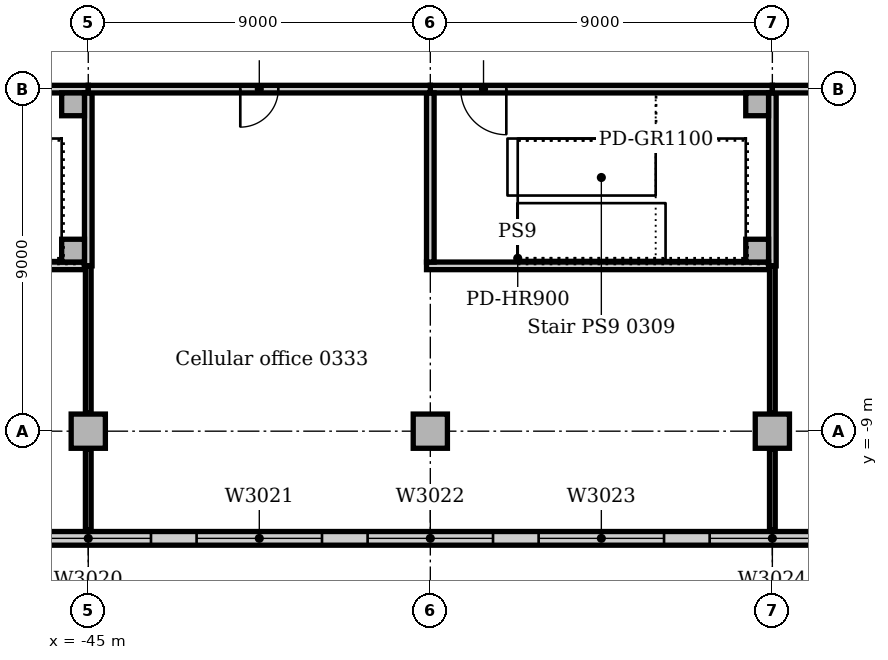
"""IFC4 building model, lengths in metres.
Left out: names, types, materials, properties, quantities, classifications, styles, units other than length and angle.
Written with IfcOpenShell. Run it as: python <this file> out.ifc"""

import sys

from ifc_helpers import new_model, si_unit, direction, frame, frame_2d, origin, origin_2d, place, context, subcontext, project, spatial, rectangle, extrude, element, fill, save


model = new_model("IFC4")
c1 = context("Model", 3, precision=1e-05, world=origin(), true_north=direction((0.0, 1.0)))
c2 = subcontext(c1, "Body", "Model", "MODEL_VIEW")
j1 = project(units=[si_unit("LENGTHUNIT", "METRE"), si_unit("PLANEANGLEUNIT", "RADIAN")], contexts=[c1])
p1 = place(None, origin())
s1 = spatial("IfcSite", under=j1, at=p1, CompositionType="ELEMENT")
p2 = place(p1, origin())
s2 = spatial("IfcBuilding", under=s1, at=p2, CompositionType="ELEMENT")
p3 = place(p2, frame((0.0, 0.0, 16.0)))
s3 = spatial("IfcBuildingStorey", under=s2, at=p3, CompositionType="ELEMENT", Elevation=16.0)
for number, where, z_axis, x_axis in (
    (1, (-45.0, -9.0, 0.0), (0.0, 0.0, 1.0), (1.0, 0.0, 0.0)),
    (2, (-36.0, -9.0, 0.0), (0.0, 0.0, 1.0), (1.0, 0.0, 0.0)),
    (3, (-27.0, -9.0, 0.0), (0.0, 0.0, 1.0), (1.0, 0.0, 0.0)),
):
    element("IfcColumn", number, at=place(p3, frame(where, z_axis=z_axis, x_axis=x_axis)), inside=s3, PredefinedType="COLUMN", context=c2, shape_type="SweptSolid", body=[
        extrude(rectangle(XDim=0.9, YDim=0.9, at=origin_2d()), origin(), (0.0, 0.0, 1.0), 4.7),
    ])
p4 = place(p3, frame((-81.0, -11.82, 0.0), z_axis=(0.0, 0.0, 1.0), x_axis=(1.0, 0.0, 0.0)))
e4 = element("IfcWall", 4, at=p4, inside=s3, PredefinedType="STANDARD", context=c2, shape_type="SweptSolid", body=[
    extrude(rectangle(XDim=144.0, YDim=0.36, at=frame_2d((72.0, 0.0))), origin(), (0.0, 0.0, 1.0), 4.7),
])
p5 = place(p4, frame((2.85, 0.0, 0.9)))
e5 = element("IfcOpeningElement", 5, at=p5, cuts=e4, PredefinedType="OPENING", context=c2, shape_type="SweptSolid", body=[
    extrude(rectangle(XDim=3.3, YDim=2.4, at=frame_2d((1.65, 1.2))), frame((0.0, 0.19, 0.0), z_axis=(0.0, -1.0, 0.0), x_axis=(1.0, 0.0, 0.0)), (0.0, 0.0, 1.0), 0.38),
])
p6 = place(p4, frame((7.35, 0.0, 0.9)))
e6 = element("IfcOpeningElement", 6, at=p6, cuts=e4, PredefinedType="OPENING", context=c2, shape_type="SweptSolid", body=[
    extrude(rectangle(XDim=3.3, YDim=2.4, at=frame_2d((1.65, 1.2))), frame((0.0, 0.19, 0.0), z_axis=(0.0, -1.0, 0.0), x_axis=(1.0, 0.0, 0.0)), (0.0, 0.0, 1.0), 0.38),
])
p7 = place(p4, frame((11.85, 0.0, 0.9)))
e7 = element("IfcOpeningElement", 7, at=p7, cuts=e4, PredefinedType="OPENING", context=c2, shape_type="SweptSolid", body=[
    extrude(rectangle(XDim=3.3, YDim=2.4, at=frame_2d((1.65, 1.2))), frame((0.0, 0.19, 0.0), z_axis=(0.0, -1.0, 0.0), x_axis=(1.0, 0.0, 0.0)), (0.0, 0.0, 1.0), 0.38),
])
p8 = place(p4, frame((16.35, 0.0, 0.9)))
e8 = element("IfcOpeningElement", 8, at=p8, cuts=e4, PredefinedType="OPENING", context=c2, shape_type="SweptSolid", body=[
    extrude(rectangle(XDim=3.3, YDim=2.4, at=frame_2d((1.65, 1.2))), frame((0.0, 0.19, 0.0), z_axis=(0.0, -1.0, 0.0), x_axis=(1.0, 0.0, 0.0)), (0.0, 0.0, 1.0), 0.38),
])
p9 = place(p4, frame((20.85, 0.0, 0.9)))
e9 = element("IfcOpeningElement", 9, at=p9, cuts=e4, PredefinedType="OPENING", context=c2, shape_type="SweptSolid", body=[
    extrude(rectangle(XDim=3.3, YDim=2.4, at=frame_2d((1.65, 1.2))), frame((0.0, 0.19, 0.0), z_axis=(0.0, -1.0, 0.0), x_axis=(1.0, 0.0, 0.0)), (0.0, 0.0, 1.0), 0.38),
])
p10 = place(p4, frame((25.35, 0.0, 0.9)))
e10 = element("IfcOpeningElement", 10, at=p10, cuts=e4, PredefinedType="OPENING", context=c2, shape_type="SweptSolid", body=[
    extrude(rectangle(XDim=3.3, YDim=2.4, at=frame_2d((1.65, 1.2))), frame((0.0, 0.19, 0.0), z_axis=(0.0, -1.0, 0.0), x_axis=(1.0, 0.0, 0.0)), (0.0, 0.0, 1.0), 0.38),
])
p11 = place(p4, frame((29.85, 0.0, 0.9)))
e11 = element("IfcOpeningElement", 11, at=p11, cuts=e4, PredefinedType="OPENING", context=c2, shape_type="SweptSolid", body=[
    extrude(rectangle(XDim=3.3, YDim=2.4, at=frame_2d((1.65, 1.2))), frame((0.0, 0.19, 0.0), z_axis=(0.0, -1.0, 0.0), x_axis=(1.0, 0.0, 0.0)), (0.0, 0.0, 1.0), 0.38),
])
p12 = place(p4, frame((34.35, 0.0, 0.9)))
e12 = element("IfcOpeningElement", 12, at=p12, cuts=e4, PredefinedType="OPENING", context=c2, shape_type="SweptSolid", body=[
    extrude(rectangle(XDim=3.3, YDim=2.4, at=frame_2d((1.65, 1.2))), frame((0.0, 0.19, 0.0), z_axis=(0.0, -1.0, 0.0), x_axis=(1.0, 0.0, 0.0)), (0.0, 0.0, 1.0), 0.38),
])
p13 = place(p4, frame((38.85, 0.0, 0.9)))
e13 = element("IfcOpeningElement", 13, at=p13, cuts=e4, PredefinedType="OPENING", context=c2, shape_type="SweptSolid", body=[
    extrude(rectangle(XDim=3.3, YDim=2.4, at=frame_2d((1.65, 1.2))), frame((0.0, 0.19, 0.0), z_axis=(0.0, -1.0, 0.0), x_axis=(1.0, 0.0, 0.0)), (0.0, 0.0, 1.0), 0.38),
])
p14 = place(p4, frame((43.35, 0.0, 0.9)))
e14 = element("IfcOpeningElement", 14, at=p14, cuts=e4, PredefinedType="OPENING", context=c2, shape_type="SweptSolid", body=[
    extrude(rectangle(XDim=3.3, YDim=2.4, at=frame_2d((1.65, 1.2))), frame((0.0, 0.19, 0.0), z_axis=(0.0, -1.0, 0.0), x_axis=(1.0, 0.0, 0.0)), (0.0, 0.0, 1.0), 0.38),
])
p15 = place(p4, frame((47.85, 0.0, 0.9)))
e15 = element("IfcOpeningElement", 15, at=p15, cuts=e4, PredefinedType="OPENING", context=c2, shape_type="SweptSolid", body=[
    extrude(rectangle(XDim=3.3, YDim=2.4, at=frame_2d((1.65, 1.2))), frame((0.0, 0.19, 0.0), z_axis=(0.0, -1.0, 0.0), x_axis=(1.0, 0.0, 0.0)), (0.0, 0.0, 1.0), 0.38),
])
p16 = place(p4, frame((52.35, 0.0, 0.9)))
e16 = element("IfcOpeningElement", 16, at=p16, cuts=e4, PredefinedType="OPENING", context=c2, shape_type="SweptSolid", body=[
    extrude(rectangle(XDim=3.3, YDim=2.4, at=frame_2d((1.65, 1.2))), frame((0.0, 0.19, 0.0), z_axis=(0.0, -1.0, 0.0), x_axis=(1.0, 0.0, 0.0)), (0.0, 0.0, 1.0), 0.38),
])
p17 = place(p4, frame((56.85, 0.0, 0.9)))
e17 = element("IfcOpeningElement", 17, at=p17, cuts=e4, PredefinedType="OPENING", context=c2, shape_type="SweptSolid", body=[
    extrude(rectangle(XDim=3.3, YDim=2.4, at=frame_2d((1.65, 1.2))), frame((0.0, 0.19, 0.0), z_axis=(0.0, -1.0, 0.0), x_axis=(1.0, 0.0, 0.0)), (0.0, 0.0, 1.0), 0.38),
])
p18 = place(p4, frame((61.35, 0.0, 0.9)))
e18 = element("IfcOpeningElement", 18, at=p18, cuts=e4, PredefinedType="OPENING", context=c2, shape_type="SweptSolid", body=[
    extrude(rectangle(XDim=3.3, YDim=2.4, at=frame_2d((1.65, 1.2))), frame((0.0, 0.19, 0.0), z_axis=(0.0, -1.0, 0.0), x_axis=(1.0, 0.0, 0.0)), (0.0, 0.0, 1.0), 0.38),
])
p19 = place(p4, frame((65.85, 0.0, 0.9)))
e19 = element("IfcOpeningElement", 19, at=p19, cuts=e4, PredefinedType="OPENING", context=c2, shape_type="SweptSolid", body=[
    extrude(rectangle(XDim=3.3, YDim=2.4, at=frame_2d((1.65, 1.2))), frame((0.0, 0.19, 0.0), z_axis=(0.0, -1.0, 0.0), x_axis=(1.0, 0.0, 0.0)), (0.0, 0.0, 1.0), 0.38),
])
p20 = place(p4, frame((70.35, 0.0, 0.9)))
e20 = element("IfcOpeningElement", 20, at=p20, cuts=e4, PredefinedType="OPENING", context=c2, shape_type="SweptSolid", body=[
    extrude(rectangle(XDim=3.3, YDim=2.4, at=frame_2d((1.65, 1.2))), frame((0.0, 0.19, 0.0), z_axis=(0.0, -1.0, 0.0), x_axis=(1.0, 0.0, 0.0)), (0.0, 0.0, 1.0), 0.38),
])
p21 = place(p4, frame((74.85, 0.0, 0.9)))
e21 = element("IfcOpeningElement", 21, at=p21, cuts=e4, PredefinedType="OPENING", context=c2, shape_type="SweptSolid", body=[
    extrude(rectangle(XDim=3.3, YDim=2.4, at=frame_2d((1.65, 1.2))), frame((0.0, 0.19, 0.0), z_axis=(0.0, -1.0, 0.0), x_axis=(1.0, 0.0, 0.0)), (0.0, 0.0, 1.0), 0.38),
])
p22 = place(p4, frame((79.35, 0.0, 0.9)))
e22 = element("IfcOpeningElement", 22, at=p22, cuts=e4, PredefinedType="OPENING", context=c2, shape_type="SweptSolid", body=[
    extrude(rectangle(XDim=3.3, YDim=2.4, at=frame_2d((1.65, 1.2))), frame((0.0, 0.19, 0.0), z_axis=(0.0, -1.0, 0.0), x_axis=(1.0, 0.0, 0.0)), (0.0, 0.0, 1.0), 0.38),
])
p23 = place(p4, frame((83.85, 0.0, 0.9)))
e23 = element("IfcOpeningElement", 23, at=p23, cuts=e4, PredefinedType="OPENING", context=c2, shape_type="SweptSolid", body=[
    extrude(rectangle(XDim=3.3, YDim=2.4, at=frame_2d((1.65, 1.2))), frame((0.0, 0.19, 0.0), z_axis=(0.0, -1.0, 0.0), x_axis=(1.0, 0.0, 0.0)), (0.0, 0.0, 1.0), 0.38),
])
p24 = place(p4, frame((88.35, 0.0, 0.9)))
e24 = element("IfcOpeningElement", 24, at=p24, cuts=e4, PredefinedType="OPENING", context=c2, shape_type="SweptSolid", body=[
    extrude(rectangle(XDim=3.3, YDim=2.4, at=frame_2d((1.65, 1.2))), frame((0.0, 0.19, 0.0), z_axis=(0.0, -1.0, 0.0), x_axis=(1.0, 0.0, 0.0)), (0.0, 0.0, 1.0), 0.38),
])
p25 = place(p4, frame((92.85, 0.0, 0.9)))
e25 = element("IfcOpeningElement", 25, at=p25, cuts=e4, PredefinedType="OPENING", context=c2, shape_type="SweptSolid", body=[
    extrude(rectangle(XDim=3.3, YDim=2.4, at=frame_2d((1.65, 1.2))), frame((0.0, 0.19, 0.0), z_axis=(0.0, -1.0, 0.0), x_axis=(1.0, 0.0, 0.0)), (0.0, 0.0, 1.0), 0.38),
])
p26 = place(p4, frame((97.35, 0.0, 0.9)))
e26 = element("IfcOpeningElement", 26, at=p26, cuts=e4, PredefinedType="OPENING", context=c2, shape_type="SweptSolid", body=[
    extrude(rectangle(XDim=3.3, YDim=2.4, at=frame_2d((1.65, 1.2))), frame((0.0, 0.19, 0.0), z_axis=(0.0, -1.0, 0.0), x_axis=(1.0, 0.0, 0.0)), (0.0, 0.0, 1.0), 0.38),
])
p27 = place(p4, frame((101.85, 0.0, 0.9)))
e27 = element("IfcOpeningElement", 27, at=p27, cuts=e4, PredefinedType="OPENING", context=c2, shape_type="SweptSolid", body=[
    extrude(rectangle(XDim=3.3, YDim=2.4, at=frame_2d((1.65, 1.2))), frame((0.0, 0.19, 0.0), z_axis=(0.0, -1.0, 0.0), x_axis=(1.0, 0.0, 0.0)), (0.0, 0.0, 1.0), 0.38),
])
p28 = place(p4, frame((106.35, 0.0, 0.9)))
e28 = element("IfcOpeningElement", 28, at=p28, cuts=e4, PredefinedType="OPENING", context=c2, shape_type="SweptSolid", body=[
    extrude(rectangle(XDim=3.3, YDim=2.4, at=frame_2d((1.65, 1.2))), frame((0.0, 0.19, 0.0), z_axis=(0.0, -1.0, 0.0), x_axis=(1.0, 0.0, 0.0)), (0.0, 0.0, 1.0), 0.38),
])
p29 = place(p4, frame((110.85, 0.0, 0.9)))
e29 = element("IfcOpeningElement", 29, at=p29, cuts=e4, PredefinedType="OPENING", context=c2, shape_type="SweptSolid", body=[
    extrude(rectangle(XDim=3.3, YDim=2.4, at=frame_2d((1.65, 1.2))), frame((0.0, 0.19, 0.0), z_axis=(0.0, -1.0, 0.0), x_axis=(1.0, 0.0, 0.0)), (0.0, 0.0, 1.0), 0.38),
])
p30 = place(p4, frame((115.35, 0.0, 0.9)))
e30 = element("IfcOpeningElement", 30, at=p30, cuts=e4, PredefinedType="OPENING", context=c2, shape_type="SweptSolid", body=[
    extrude(rectangle(XDim=3.3, YDim=2.4, at=frame_2d((1.65, 1.2))), frame((0.0, 0.19, 0.0), z_axis=(0.0, -1.0, 0.0), x_axis=(1.0, 0.0, 0.0)), (0.0, 0.0, 1.0), 0.38),
])
p31 = place(p4, frame((119.85, 0.0, 0.9)))
e31 = element("IfcOpeningElement", 31, at=p31, cuts=e4, PredefinedType="OPENING", context=c2, shape_type="SweptSolid", body=[
    extrude(rectangle(XDim=3.3, YDim=2.4, at=frame_2d((1.65, 1.2))), frame((0.0, 0.19, 0.0), z_axis=(0.0, -1.0, 0.0), x_axis=(1.0, 0.0, 0.0)), (0.0, 0.0, 1.0), 0.38),
])
p32 = place(p4, frame((124.35, 0.0, 0.9)))
e32 = element("IfcOpeningElement", 32, at=p32, cuts=e4, PredefinedType="OPENING", context=c2, shape_type="SweptSolid", body=[
    extrude(rectangle(XDim=3.3, YDim=2.4, at=frame_2d((1.65, 1.2))), frame((0.0, 0.19, 0.0), z_axis=(0.0, -1.0, 0.0), x_axis=(1.0, 0.0, 0.0)), (0.0, 0.0, 1.0), 0.38),
])
p33 = place(p4, frame((128.85, 0.0, 0.9)))
e33 = element("IfcOpeningElement", 33, at=p33, cuts=e4, PredefinedType="OPENING", context=c2, shape_type="SweptSolid", body=[
    extrude(rectangle(XDim=3.3, YDim=2.4, at=frame_2d((1.65, 1.2))), frame((0.0, 0.19, 0.0), z_axis=(0.0, -1.0, 0.0), x_axis=(1.0, 0.0, 0.0)), (0.0, 0.0, 1.0), 0.38),
])
p34 = place(p4, frame((133.35, 0.0, 0.9)))
e34 = element("IfcOpeningElement", 34, at=p34, cuts=e4, PredefinedType="OPENING", context=c2, shape_type="SweptSolid", body=[
    extrude(rectangle(XDim=3.3, YDim=2.4, at=frame_2d((1.65, 1.2))), frame((0.0, 0.19, 0.0), z_axis=(0.0, -1.0, 0.0), x_axis=(1.0, 0.0, 0.0)), (0.0, 0.0, 1.0), 0.38),
])
p35 = place(p4, frame((137.85, 0.0, 0.9)))
e35 = element("IfcOpeningElement", 35, at=p35, cuts=e4, PredefinedType="OPENING", context=c2, shape_type="SweptSolid", body=[
    extrude(rectangle(XDim=3.3, YDim=2.4, at=frame_2d((1.65, 1.2))), frame((0.0, 0.19, 0.0), z_axis=(0.0, -1.0, 0.0), x_axis=(1.0, 0.0, 0.0)), (0.0, 0.0, 1.0), 0.38),
])
for number, where, z_axis, x_axis in (
    (36, (-45.4, -4.25, 0.0), (0.0, 0.0, 1.0), (1.0, 0.0, 0.0)),
    (37, (-45.4, -0.4, 0.0), (0.0, 0.0, 1.0), (1.0, 0.0, 0.0)),
    (38, (-27.4, -4.25, 0.0), (0.0, 0.0, 1.0), (1.0, 0.0, 0.0)),
    (39, (-27.4, -0.4, 0.0), (0.0, 0.0, 1.0), (1.0, 0.0, 0.0)),
):
    element("IfcColumn", number, at=place(p3, frame(where, z_axis=z_axis, x_axis=x_axis)), inside=s3, PredefinedType="COLUMN", context=c2, shape_type="SweptSolid", body=[
        extrude(rectangle(XDim=0.6, YDim=0.6, at=origin_2d()), origin(), (0.0, 0.0, 1.0), 5.0),
    ])
p36 = place(p3, frame((-54.0, 0.0, 0.0), z_axis=(0.0, 0.0, 1.0), x_axis=(1.0, 0.0, 0.0)))
e40 = element("IfcWall", 40, at=p36, inside=s3, PredefinedType="SOLIDWALL", context=c2, shape_type="SweptSolid", body=[
    extrude(rectangle(XDim=9.0, YDim=0.2, at=frame_2d((4.5, 0.0))), origin(), (0.0, 0.0, 1.0), 4.7),
])
p37 = place(p36, frame((0.8, 0.0, 0.0)))
e41 = element("IfcOpeningElement", 41, at=p37, cuts=e40, PredefinedType="OPENING", context=c2, shape_type="SweptSolid", body=[
    extrude(rectangle(XDim=1.2, YDim=2.1, at=frame_2d((0.6, 1.05))), frame((0.0, 0.11, 0.0), z_axis=(0.0, -1.0, 0.0), x_axis=(1.0, 0.0, 0.0)), (0.0, 0.0, 1.0), 0.22),
])
p38 = place(p3, frame((-54.1, -4.65, 0.0), z_axis=(0.0, 0.0, 1.0), x_axis=(1.0, 0.0, 0.0)))
e42 = element("IfcWall", 42, at=p38, inside=s3, PredefinedType="SOLIDWALL", context=c2, shape_type="SweptSolid", body=[
    extrude(rectangle(XDim=9.0, YDim=0.2, at=frame_2d((4.5, 0.0))), origin(), (0.0, 0.0, 1.0), 4.7),
])
p39 = place(p3, frame((-45.0, -4.65, 0.0), z_axis=(0.0, 0.0, 1.0), x_axis=(0.0, 1.0, 0.0)))
e43 = element("IfcWall", 43, at=p39, inside=s3, PredefinedType="SOLIDWALL", context=c2, shape_type="SweptSolid", body=[
    extrude(rectangle(XDim=4.55, YDim=0.2, at=frame_2d((2.275, 0.0))), origin(), (0.0, 0.0, 1.0), 4.7),
])
p40 = place(p3, frame((-36.0, 0.0, 0.0), z_axis=(0.0, 0.0, 1.0), x_axis=(1.0, 0.0, 0.0)))
e44 = element("IfcWall", 44, at=p40, inside=s3, PredefinedType="SOLIDWALL", context=c2, shape_type="SweptSolid", body=[
    extrude(rectangle(XDim=9.0, YDim=0.2, at=frame_2d((4.5, 0.0))), origin(), (0.0, 0.0, 1.0), 4.7),
])
p41 = place(p40, frame((0.8, 0.0, 0.0)))
e45 = element("IfcOpeningElement", 45, at=p41, cuts=e44, PredefinedType="OPENING", context=c2, shape_type="SweptSolid", body=[
    extrude(rectangle(XDim=1.2, YDim=2.1, at=frame_2d((0.6, 1.05))), frame((0.0, 0.11, 0.0), z_axis=(0.0, -1.0, 0.0), x_axis=(1.0, 0.0, 0.0)), (0.0, 0.0, 1.0), 0.22),
])
p42 = place(p3, frame((-27.0, -4.65, 0.0), z_axis=(0.0, 0.0, 1.0), x_axis=(0.0, 1.0, 0.0)))
e46 = element("IfcWall", 46, at=p42, inside=s3, PredefinedType="SOLIDWALL", context=c2, shape_type="SweptSolid", body=[
    extrude(rectangle(XDim=4.55, YDim=0.2, at=frame_2d((2.275, 0.0))), origin(), (0.0, 0.0, 1.0), 4.7),
])
p43 = place(p3, frame((-36.1, -4.65, 0.0), z_axis=(0.0, 0.0, 1.0), x_axis=(1.0, 0.0, 0.0)))
e47 = element("IfcWall", 47, at=p43, inside=s3, PredefinedType="SOLIDWALL", context=c2, shape_type="SweptSolid", body=[
    extrude(rectangle(XDim=9.0, YDim=0.2, at=frame_2d((4.5, 0.0))), origin(), (0.0, 0.0, 1.0), 4.7),
])
p44 = place(p3, frame((-36.0, -4.55, 0.0), z_axis=(0.0, 0.0, 1.0), x_axis=(0.0, 1.0, 0.0)))
e48 = element("IfcWall", 48, at=p44, inside=s3, PredefinedType="SOLIDWALL", context=c2, shape_type="SweptSolid", body=[
    extrude(rectangle(XDim=4.45, YDim=0.2, at=frame_2d((2.225, 0.0))), origin(), (0.0, 0.0, 1.0), 4.7),
])
p45 = place(p3, frame((-45.0, 0.0, 0.0), z_axis=(0.0, 0.0, 1.0), x_axis=(1.0, 0.0, 0.0)))
e49 = element("IfcWall", 49, at=p45, inside=s3, PredefinedType="PARTITIONING", context=c2, shape_type="SweptSolid", body=[
    extrude(rectangle(XDim=9.0, YDim=0.2, at=frame_2d((4.5, 0.0))), origin(), (0.0, 0.0, 1.0), 4.7),
])
p46 = place(p45, frame((4.0, 0.0, 0.0)))
e50 = element("IfcOpeningElement", 50, at=p46, cuts=e49, PredefinedType="OPENING", context=c2, shape_type="SweptSolid", body=[
    extrude(rectangle(XDim=1.0, YDim=2.1, at=frame_2d((0.5, 1.05))), frame((0.0, 0.11, 0.0), z_axis=(0.0, -1.0, 0.0), x_axis=(1.0, 0.0, 0.0)), (0.0, 0.0, 1.0), 0.22),
])
p47 = place(p3, frame((-27.0, 0.0, 0.0), z_axis=(0.0, 0.0, 1.0), x_axis=(1.0, 0.0, 0.0)))
e51 = element("IfcWall", 51, at=p47, inside=s3, PredefinedType="PARTITIONING", context=c2, shape_type="SweptSolid", body=[
    extrude(rectangle(XDim=8.53, YDim=0.2, at=frame_2d((4.265, 0.0))), origin(), (0.0, 0.0, 1.0), 4.7),
])
p48 = place(p47, frame((4.0, 0.0, 0.0)))
e52 = element("IfcOpeningElement", 52, at=p48, cuts=e51, PredefinedType="OPENING", context=c2, shape_type="SweptSolid", body=[
    extrude(rectangle(XDim=1.0, YDim=2.1, at=frame_2d((0.5, 1.05))), frame((0.0, 0.11, 0.0), z_axis=(0.0, -1.0, 0.0), x_axis=(1.0, 0.0, 0.0)), (0.0, 0.0, 1.0), 0.22),
])
p49 = place(p3, frame((-27.0, -11.6, 0.0), z_axis=(0.0, 0.0, 1.0), x_axis=(0.0, 1.0, 0.0)))
e53 = element("IfcWall", 53, at=p49, inside=s3, PredefinedType="PARTITIONING", context=c2, shape_type="SweptSolid", body=[
    extrude(rectangle(XDim=2.13, YDim=0.15, at=frame_2d((1.065, 0.0))), origin(), (0.0, 0.0, 1.0), 4.7),
])
p50 = place(p3, frame((-27.0, -8.53, 0.0), z_axis=(0.0, 0.0, 1.0), x_axis=(0.0, 1.0, 0.0)))
e54 = element("IfcWall", 54, at=p50, inside=s3, PredefinedType="PARTITIONING", context=c2, shape_type="SweptSolid", body=[
    extrude(rectangle(XDim=3.88, YDim=0.15, at=frame_2d((1.94, 0.0))), origin(), (0.0, 0.0, 1.0), 4.7),
])
p51 = place(p3, frame((-45.0, -11.6, 0.0), z_axis=(0.0, 0.0, 1.0), x_axis=(0.0, 1.0, 0.0)))
e55 = element("IfcWall", 55, at=p51, inside=s3, PredefinedType="PARTITIONING", context=c2, shape_type="SweptSolid", body=[
    extrude(rectangle(XDim=2.13, YDim=0.15, at=frame_2d((1.065, 0.0))), origin(), (0.0, 0.0, 1.0), 4.7),
])
p52 = place(p3, frame((-45.0, -8.53, 0.0), z_axis=(0.0, 0.0, 1.0), x_axis=(0.0, 1.0, 0.0)))
e56 = element("IfcWall", 56, at=p52, inside=s3, PredefinedType="PARTITIONING", context=c2, shape_type="SweptSolid", body=[
    extrude(rectangle(XDim=3.88, YDim=0.15, at=frame_2d((1.94, 0.0))), origin(), (0.0, 0.0, 1.0), 4.7),
])
p53 = place(p12, origin())
e57 = element("IfcWindow", 57, at=p53, inside=s3, PartitioningType="SINGLE_PANEL", PredefinedType="WINDOW", context=c2, shape_type="SweptSolid", body=[
    extrude(rectangle(XDim=3.3, YDim=2.4, at=frame_2d((1.65, 1.2))), frame((0.0, 0.13, 0.0), z_axis=(0.0, -1.0, 0.0), x_axis=(1.0, 0.0, 0.0)), (0.0, 0.0, 1.0), 0.06),
])
fill(e12, e57)
p54 = place(p13, origin())
e58 = element("IfcWindow", 58, at=p54, inside=s3, PartitioningType="SINGLE_PANEL", PredefinedType="WINDOW", context=c2, shape_type="SweptSolid", body=[
    extrude(rectangle(XDim=3.3, YDim=2.4, at=frame_2d((1.65, 1.2))), frame((0.0, 0.13, 0.0), z_axis=(0.0, -1.0, 0.0), x_axis=(1.0, 0.0, 0.0)), (0.0, 0.0, 1.0), 0.06),
])
fill(e13, e58)
p55 = place(p14, origin())
e59 = element("IfcWindow", 59, at=p55, inside=s3, PartitioningType="SINGLE_PANEL", PredefinedType="WINDOW", context=c2, shape_type="SweptSolid", body=[
    extrude(rectangle(XDim=3.3, YDim=2.4, at=frame_2d((1.65, 1.2))), frame((0.0, 0.13, 0.0), z_axis=(0.0, -1.0, 0.0), x_axis=(1.0, 0.0, 0.0)), (0.0, 0.0, 1.0), 0.06),
])
fill(e14, e59)
p56 = place(p15, origin())
e60 = element("IfcWindow", 60, at=p56, inside=s3, PartitioningType="SINGLE_PANEL", PredefinedType="WINDOW", context=c2, shape_type="SweptSolid", body=[
    extrude(rectangle(XDim=3.3, YDim=2.4, at=frame_2d((1.65, 1.2))), frame((0.0, 0.13, 0.0), z_axis=(0.0, -1.0, 0.0), x_axis=(1.0, 0.0, 0.0)), (0.0, 0.0, 1.0), 0.06),
])
fill(e15, e60)
p57 = place(p16, origin())
e61 = element("IfcWindow", 61, at=p57, inside=s3, PartitioningType="SINGLE_PANEL", PredefinedType="WINDOW", context=c2, shape_type="SweptSolid", body=[
    extrude(rectangle(XDim=3.3, YDim=2.4, at=frame_2d((1.65, 1.2))), frame((0.0, 0.13, 0.0), z_axis=(0.0, -1.0, 0.0), x_axis=(1.0, 0.0, 0.0)), (0.0, 0.0, 1.0), 0.06),
])
fill(e16, e61)
p58 = place(p46, frame((1.0, 0.0, 0.0), z_axis=(0.0, 0.0, 1.0), x_axis=(-1.0, 0.0, 0.0)))
e62 = element("IfcDoor", 62, at=p58, inside=s3, OperationType="SINGLE_SWING_RIGHT", PredefinedType="DOOR", context=c2, shape_type="SweptSolid", body=[
    extrude(rectangle(XDim=1.0, YDim=2.1, at=frame_2d((0.5, 1.05))), frame((0.0, 0.025, 0.0), z_axis=(0.0, -1.0, 0.0), x_axis=(1.0, 0.0, 0.0)), (0.0, 0.0, 1.0), 0.05),
])
fill(e50, e62)
p59 = place(p41, frame((1.2, 0.0, 0.0), z_axis=(0.0, 0.0, 1.0), x_axis=(-1.0, 0.0, 0.0)))
e63 = element("IfcDoor", 63, at=p59, inside=s3, OperationType="SINGLE_SWING_LEFT", PredefinedType="DOOR", context=c2, shape_type="SweptSolid", body=[
    extrude(rectangle(XDim=1.2, YDim=2.1, at=frame_2d((0.6, 1.05))), frame((0.0, 0.025, 0.0), z_axis=(0.0, -1.0, 0.0), x_axis=(1.0, 0.0, 0.0)), (0.0, 0.0, 1.0), 0.05),
])
fill(e45, e63)
save(model, sys.argv[1])
